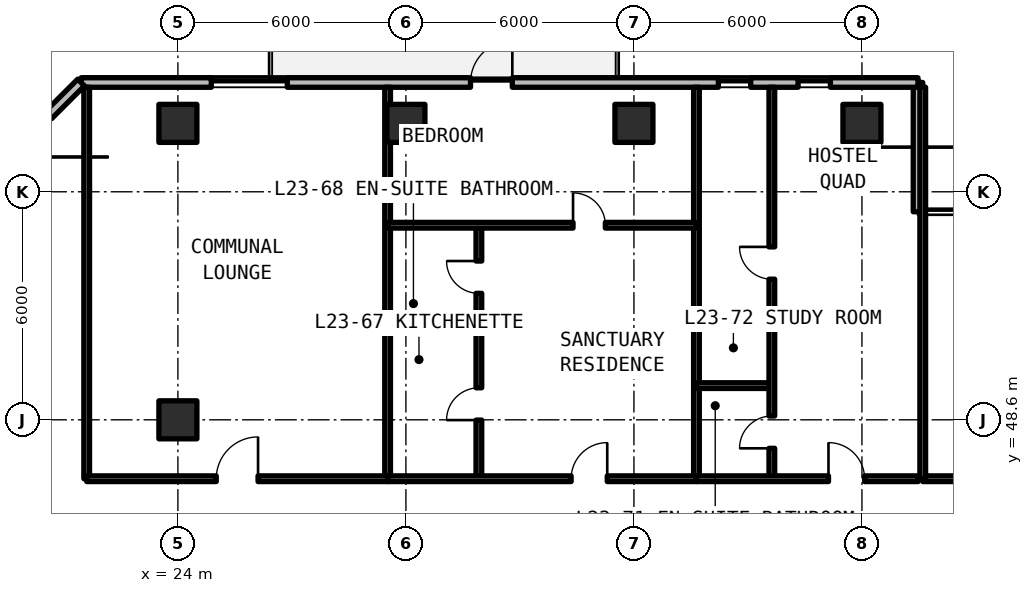
"""IFC4 building model, lengths in metres.
Left out: names, types, materials, properties, quantities, classifications, styles, units other than length and angle.
Written with IfcOpenShell. Run it as: python <this file> out.ifc"""

import sys

from ifc_helpers import new_model, si_unit, direction, frame, frame_2d, origin, origin_2d, place, context, subcontext, project, spatial, rectangle, extrude, element, fill, save


model = new_model("IFC4")
c1 = context("Model", 3, precision=1e-05, world=origin(), true_north=direction((0.0, 1.0)))
c2 = subcontext(c1, "Body", "Model", "MODEL_VIEW")
j1 = project(units=[si_unit("LENGTHUNIT", "METRE"), si_unit("PLANEANGLEUNIT", "RADIAN")], contexts=[c1])
p1 = place(None, origin())
s1 = spatial("IfcSite", under=j1, at=p1, CompositionType="ELEMENT")
p2 = place(p1, origin())
s2 = spatial("IfcBuilding", under=s1, at=p2, CompositionType="ELEMENT")
p3 = place(p2, frame((0.0, 0.0, 85.47)))
s3 = spatial("IfcBuildingStorey", under=s2, at=p3, CompositionType="ELEMENT", Elevation=85.47)
for number, where, z_axis, x_axis in (
    (1, (24.0, 48.6, 0.0), (0.0, 0.0, 1.0), (1.0, 0.0, 0.0)),
    (2, (24.0, 56.4, 0.0), (0.0, 0.0, 1.0), (1.0, 0.0, 0.0)),
    (3, (30.0, 56.4, 0.0), (0.0, 0.0, 1.0), (1.0, 0.0, 0.0)),
    (4, (36.0, 56.4, 0.0), (0.0, 0.0, 1.0), (1.0, 0.0, 0.0)),
    (5, (42.0, 56.4, 0.0), (0.0, 0.0, 1.0), (1.0, 0.0, 0.0)),
):
    element("IfcColumn", number, at=place(p3, frame(where, z_axis=z_axis, x_axis=x_axis)), inside=s3, PredefinedType="COLUMN", context=c2, shape_type="SweptSolid", body=[
        extrude(rectangle(XDim=1.0, YDim=1.0, at=origin_2d()), origin(), (0.0, 0.0, 1.0), 3.3),
    ])
p4 = place(p3, frame((43.475, 54.075, 0.0), z_axis=(0.0, 0.0, 1.0), x_axis=(0.0, 1.0, 0.0)))
e6 = element("IfcWall", 6, at=p4, inside=s3, PredefinedType="SOLIDWALL", context=c2, shape_type="SweptSolid", body=[
    extrude(rectangle(XDim=3.4, YDim=0.25, at=frame_2d((1.7, 0.0))), origin(), (0.0, 0.0, 1.0), 3.08),
])
p5 = place(p3, frame((43.475, 57.475, 0.0), z_axis=(0.0, 0.0, 1.0), x_axis=(-1.0, 0.0, 0.0)))
e7 = element("IfcWall", 7, at=p5, inside=s3, PredefinedType="SOLIDWALL", context=c2, shape_type="SweptSolid", body=[
    extrude(rectangle(XDim=22.023, YDim=0.25, at=frame_2d((11.012, 0.0))), origin(), (0.0, 0.0, 1.0), 3.08),
])
p6 = place(p5, frame((10.675, 0.0, 0.0)))
e8 = element("IfcOpeningElement", 8, at=p6, cuts=e7, PredefinedType="OPENING", context=c2, shape_type="SweptSolid", body=[
    extrude(rectangle(XDim=1.1, YDim=2.15, at=frame_2d((0.55, 1.075))), frame((0.0, 0.135, 0.0), z_axis=(0.0, -1.0, 0.0), x_axis=(1.0, 0.0, 0.0)), (0.0, 0.0, 1.0), 0.27),
])
p7 = place(p5, frame((16.596, 0.0, 0.78)))
e9 = element("IfcOpeningElement", 9, at=p7, cuts=e7, PredefinedType="OPENING", context=c2, shape_type="SweptSolid", body=[
    extrude(rectangle(XDim=2.0, YDim=1.66, at=frame_2d((1.0, 0.83))), frame((0.0, 0.135, 0.0), z_axis=(0.0, -1.0, 0.0), x_axis=(1.0, 0.0, 0.0)), (0.0, 0.0, 1.0), 0.27),
])
p8 = place(p5, frame((4.403, 0.0, 0.78)))
e10 = element("IfcOpeningElement", 10, at=p8, cuts=e7, PredefinedType="OPENING", context=c2, shape_type="SweptSolid", body=[
    extrude(rectangle(XDim=0.85, YDim=1.65, at=frame_2d((0.425, 0.825))), frame((0.0, 0.135, 0.0), z_axis=(0.0, -1.0, 0.0), x_axis=(1.0, 0.0, 0.0)), (0.0, 0.0, 1.0), 0.27),
])
p9 = place(p5, frame((2.305, 0.0, 0.78)))
e11 = element("IfcOpeningElement", 11, at=p9, cuts=e7, PredefinedType="OPENING", context=c2, shape_type="SweptSolid", body=[
    extrude(rectangle(XDim=0.85, YDim=1.65, at=frame_2d((0.425, 0.825))), frame((0.0, 0.135, 0.0), z_axis=(0.0, -1.0, 0.0), x_axis=(1.0, 0.0, 0.0)), (0.0, 0.0, 1.0), 0.27),
])
p10 = place(p3, frame((21.452, 57.475, 0.0), z_axis=(0.0, 0.0, 1.0), x_axis=(-0.707106781187, -0.707106781187, 0.0)))
e12 = element("IfcWall", 12, at=p10, inside=s3, PredefinedType="SOLIDWALL", context=c2, shape_type="SweptSolid", body=[
    extrude(rectangle(XDim=5.836, YDim=0.25, at=frame_2d((2.918, 0.0))), origin(), (0.0, 0.0, 1.0), 3.08),
])
p11 = place(p10, frame((1.218, 0.0, 0.78)))
e13 = element("IfcOpeningElement", 13, at=p11, cuts=e12, PredefinedType="OPENING", context=c2, shape_type="SweptSolid", body=[
    extrude(rectangle(XDim=3.4, YDim=1.66, at=frame_2d((1.7, 0.83))), frame((0.0, 0.135, 0.0), z_axis=(0.0, -1.0, 0.0), x_axis=(1.0, 0.0, 0.0)), (0.0, 0.0, 1.0), 0.27),
])
p12 = place(p3, frame((43.6, 47.05, 0.0), z_axis=(0.0, 0.0, 1.0), x_axis=(1.0, 0.0, 0.0)))
e14 = element("IfcWall", 14, at=p12, inside=s3, PredefinedType="SOLIDWALL", context=c2, shape_type="SweptSolid", body=[
    extrude(rectangle(XDim=8.4, YDim=0.15, at=frame_2d((4.2, 0.0))), origin(), (0.0, 0.0, 1.0), 2.35),
])
p13 = place(p12, frame((3.65, 0.0, 0.0)))
e15 = element("IfcOpeningElement", 15, at=p13, cuts=e14, PredefinedType="OPENING", context=c2, shape_type="SweptSolid", body=[
    extrude(rectangle(XDim=1.1, YDim=2.15, at=frame_2d((0.55, 1.075))), frame((0.0, 0.085, 0.0), z_axis=(0.0, -1.0, 0.0), x_axis=(1.0, 0.0, 0.0)), (0.0, 0.0, 1.0), 0.17),
])
for number, where, z_axis, x_axis in (
    (16, (43.6, 47.05, 0.0), (0.0, 0.0, 1.0), (0.0, 1.0, 0.0)),
    (17, (21.6, 47.05, 0.0), (0.0, 0.0, 1.0), (0.0, 1.0, 0.0)),
    (18, (29.519, 47.05, 0.0), (0.0, 0.0, 1.0), (0.0, 1.0, 0.0)),
):
    element("IfcWall", number, at=place(p3, frame(where, z_axis=z_axis, x_axis=x_axis)), inside=s3, PredefinedType="SOLIDWALL", context=c2, shape_type="SweptSolid", body=[
        extrude(rectangle(XDim=10.3, YDim=0.15, at=frame_2d((5.15, 0.0))), origin(), (0.0, 0.0, 1.0), 2.35),
    ])
p14 = place(p3, frame((21.6, 47.05, 0.0), z_axis=(0.0, 0.0, 1.0), x_axis=(1.0, 0.0, 0.0)))
e19 = element("IfcWall", 19, at=p14, inside=s3, PredefinedType="SOLIDWALL", context=c2, shape_type="SweptSolid", body=[
    extrude(rectangle(XDim=7.918, YDim=0.15, at=frame_2d((3.959, 0.0))), origin(), (0.0, 0.0, 1.0), 2.35),
])
p15 = place(p14, frame((3.409, 0.0, 0.0)))
e20 = element("IfcOpeningElement", 20, at=p15, cuts=e19, PredefinedType="OPENING", context=c2, shape_type="SweptSolid", body=[
    extrude(rectangle(XDim=1.1, YDim=2.15, at=frame_2d((0.55, 1.075))), frame((0.0, 0.085, 0.0), z_axis=(0.0, -1.0, 0.0), x_axis=(1.0, 0.0, 0.0)), (0.0, 0.0, 1.0), 0.17),
])
p16 = place(p3, frame((37.646, 47.05, 0.0), z_axis=(0.0, 0.0, 1.0), x_axis=(0.0, 1.0, 0.0)))
e21 = element("IfcWall", 21, at=p16, inside=s3, PredefinedType="SOLIDWALL", context=c2, shape_type="SweptSolid", body=[
    extrude(rectangle(XDim=10.3, YDim=0.15, at=frame_2d((5.15, 0.0))), origin(), (0.0, 0.0, 1.0), 2.35),
])
p17 = place(p3, frame((29.519, 50.985, 0.0), z_axis=(0.0, 0.0, 1.0), x_axis=(1.0, 0.0, 0.0)))
e22 = element("IfcWall", 22, at=p17, inside=s3, PredefinedType="PARTITIONING", context=c2, shape_type="SweptSolid", body=[
    extrude(rectangle(XDim=2.401, YDim=0.15, at=frame_2d((1.201, 0.0))), origin(), (0.0, 0.0, 1.0), 2.35),
])
p18 = place(p3, frame((31.92, 47.05, 0.0), z_axis=(0.0, 0.0, 1.0), x_axis=(0.0, 1.0, 0.0)))
e23 = element("IfcWall", 23, at=p18, inside=s3, PredefinedType="PARTITIONING", context=c2, shape_type="SweptSolid", body=[
    extrude(rectangle(XDim=6.67, YDim=0.15, at=frame_2d((3.335, 0.0))), origin(), (0.0, 0.0, 1.0), 2.35),
])
p19 = place(p18, frame((1.543, 0.0, 0.0)))
e24 = element("IfcOpeningElement", 24, at=p19, cuts=e23, PredefinedType="OPENING", context=c2, shape_type="SweptSolid", body=[
    extrude(rectangle(XDim=0.85, YDim=2.1, at=frame_2d((0.425, 1.05))), frame((0.0, 0.085, 0.0), z_axis=(0.0, -1.0, 0.0), x_axis=(1.0, 0.0, 0.0)), (0.0, 0.0, 1.0), 0.17),
])
p20 = place(p18, frame((4.878, 0.0, 0.0)))
e25 = element("IfcOpeningElement", 25, at=p20, cuts=e23, PredefinedType="OPENING", context=c2, shape_type="SweptSolid", body=[
    extrude(rectangle(XDim=0.85, YDim=2.1, at=frame_2d((0.425, 1.05))), frame((0.0, 0.085, 0.0), z_axis=(0.0, -1.0, 0.0), x_axis=(1.0, 0.0, 0.0)), (0.0, 0.0, 1.0), 0.17),
])
p21 = place(p3, frame((29.519, 53.72, 0.0), z_axis=(0.0, 0.0, 1.0), x_axis=(1.0, 0.0, 0.0)))
e26 = element("IfcWall", 26, at=p21, inside=s3, PredefinedType="PARTITIONING", context=c2, shape_type="SweptSolid", body=[
    extrude(rectangle(XDim=8.127, YDim=0.15, at=frame_2d((4.063, 0.0))), origin(), (0.0, 0.0, 1.0), 2.35),
])
p22 = place(p21, frame((4.879, 0.0, 0.0)))
e27 = element("IfcOpeningElement", 27, at=p22, cuts=e26, PredefinedType="OPENING", context=c2, shape_type="SweptSolid", body=[
    extrude(rectangle(XDim=0.85, YDim=2.1, at=frame_2d((0.425, 1.05))), frame((0.0, 0.085, 0.0), z_axis=(0.0, -1.0, 0.0), x_axis=(1.0, 0.0, 0.0)), (0.0, 0.0, 1.0), 0.17),
])
p23 = place(p3, frame((29.519, 47.05, 0.0), z_axis=(0.0, 0.0, 1.0), x_axis=(1.0, 0.0, 0.0)))
e28 = element("IfcWall", 28, at=p23, inside=s3, PredefinedType="SOLIDWALL", context=c2, shape_type="SweptSolid", body=[
    extrude(rectangle(XDim=8.127, YDim=0.15, at=frame_2d((4.063, 0.0))), origin(), (0.0, 0.0, 1.0), 2.35),
])
p24 = place(p23, frame((4.829, 0.0, 0.0)))
e29 = element("IfcOpeningElement", 29, at=p24, cuts=e28, PredefinedType="OPENING", context=c2, shape_type="SweptSolid", body=[
    extrude(rectangle(XDim=0.95, YDim=2.15, at=frame_2d((0.475, 1.075))), frame((0.0, 0.085, 0.0), z_axis=(0.0, -1.0, 0.0), x_axis=(1.0, 0.0, 0.0)), (0.0, 0.0, 1.0), 0.17),
])
p25 = place(p3, frame((37.646, 49.5, 0.0), z_axis=(0.0, 0.0, 1.0), x_axis=(1.0, 0.0, 0.0)))
e30 = element("IfcWall", 30, at=p25, inside=s3, PredefinedType="PARTITIONING", context=c2, shape_type="SweptSolid", body=[
    extrude(rectangle(XDim=1.984, YDim=0.15, at=frame_2d((0.992, 0.0))), origin(), (0.0, 0.0, 1.0), 2.35),
])
p26 = place(p3, frame((39.629, 47.05, 0.0), z_axis=(0.0, 0.0, 1.0), x_axis=(0.0, 1.0, 0.0)))
e31 = element("IfcWall", 31, at=p26, inside=s3, PredefinedType="PARTITIONING", context=c2, shape_type="SweptSolid", body=[
    extrude(rectangle(XDim=10.3, YDim=0.15, at=frame_2d((5.15, 0.0))), origin(), (0.0, 0.0, 1.0), 2.35),
])
p27 = place(p26, frame((0.8, 0.0, 0.0)))
e32 = element("IfcOpeningElement", 32, at=p27, cuts=e31, PredefinedType="OPENING", context=c2, shape_type="SweptSolid", body=[
    extrude(rectangle(XDim=0.85, YDim=2.1, at=frame_2d((0.425, 1.05))), frame((0.0, 0.085, 0.0), z_axis=(0.0, -1.0, 0.0), x_axis=(1.0, 0.0, 0.0)), (0.0, 0.0, 1.0), 0.17),
])
p28 = place(p26, frame((5.25, 0.0, 0.0)))
e33 = element("IfcOpeningElement", 33, at=p28, cuts=e31, PredefinedType="OPENING", context=c2, shape_type="SweptSolid", body=[
    extrude(rectangle(XDim=0.85, YDim=2.1, at=frame_2d((0.425, 1.05))), frame((0.0, 0.085, 0.0), z_axis=(0.0, -1.0, 0.0), x_axis=(1.0, 0.0, 0.0)), (0.0, 0.0, 1.0), 0.17),
])
p29 = place(p3, frame((37.646, 47.05, 0.0), z_axis=(0.0, 0.0, 1.0), x_axis=(1.0, 0.0, 0.0)))
e34 = element("IfcWall", 34, at=p29, inside=s3, PredefinedType="SOLIDWALL", context=c2, shape_type="SweptSolid", body=[
    extrude(rectangle(XDim=5.834, YDim=0.15, at=frame_2d((2.917, 0.0))), origin(), (0.0, 0.0, 1.0), 2.35),
])
p30 = place(p29, frame((3.474, 0.0, 0.0)))
e35 = element("IfcOpeningElement", 35, at=p30, cuts=e34, PredefinedType="OPENING", context=c2, shape_type="SweptSolid", body=[
    extrude(rectangle(XDim=0.95, YDim=2.15, at=frame_2d((0.475, 1.075))), frame((0.0, 0.085, 0.0), z_axis=(0.0, -1.0, 0.0), x_axis=(1.0, 0.0, 0.0)), (0.0, 0.0, 1.0), 0.17),
])
p31 = place(p6, frame((1.1, 0.0, 0.0), z_axis=(0.0, 0.0, 1.0), x_axis=(-1.0, 0.0, 0.0)))
e36 = element("IfcDoor", 36, at=p31, inside=s3, OperationType="SINGLE_SWING_RIGHT", PredefinedType="DOOR", context=c2, shape_type="SweptSolid", body=[
    extrude(rectangle(XDim=1.1, YDim=2.15, at=frame_2d((0.55, 1.075))), frame((0.0, 0.025, 0.0), z_axis=(0.0, -1.0, 0.0), x_axis=(1.0, 0.0, 0.0)), (0.0, 0.0, 1.0), 0.05),
])
fill(e8, e36)
p32 = place(p7, origin())
e37 = element("IfcWindow", 37, at=p32, inside=s3, PartitioningType="SINGLE_PANEL", PredefinedType="WINDOW", context=c2, shape_type="SweptSolid", body=[
    extrude(rectangle(XDim=2.0, YDim=1.66, at=frame_2d((1.0, 0.83))), frame((0.0, 0.03, 0.0), z_axis=(0.0, -1.0, 0.0), x_axis=(1.0, 0.0, 0.0)), (0.0, 0.0, 1.0), 0.06),
])
fill(e9, e37)
p33 = place(p8, origin())
e38 = element("IfcWindow", 38, at=p33, inside=s3, PartitioningType="SINGLE_PANEL", PredefinedType="WINDOW", context=c2, shape_type="SweptSolid", body=[
    extrude(rectangle(XDim=0.85, YDim=1.65, at=frame_2d((0.425, 0.825))), frame((0.0, 0.03, 0.0), z_axis=(0.0, -1.0, 0.0), x_axis=(1.0, 0.0, 0.0)), (0.0, 0.0, 1.0), 0.06),
])
fill(e10, e38)
p34 = place(p9, origin())
e39 = element("IfcWindow", 39, at=p34, inside=s3, PartitioningType="SINGLE_PANEL", PredefinedType="WINDOW", context=c2, shape_type="SweptSolid", body=[
    extrude(rectangle(XDim=0.85, YDim=1.65, at=frame_2d((0.425, 0.825))), frame((0.0, 0.03, 0.0), z_axis=(0.0, -1.0, 0.0), x_axis=(1.0, 0.0, 0.0)), (0.0, 0.0, 1.0), 0.06),
])
fill(e11, e39)
p35 = place(p15, origin())
e40 = element("IfcDoor", 40, at=p35, inside=s3, OperationType="SINGLE_SWING_RIGHT", PredefinedType="DOOR", context=c2, shape_type="SweptSolid", body=[
    extrude(rectangle(XDim=1.1, YDim=2.15, at=frame_2d((0.55, 1.075))), frame((0.0, 0.025, 0.0), z_axis=(0.0, -1.0, 0.0), x_axis=(1.0, 0.0, 0.0)), (0.0, 0.0, 1.0), 0.05),
])
fill(e20, e40)
p36 = place(p19, origin())
e41 = element("IfcDoor", 41, at=p36, inside=s3, OperationType="SINGLE_SWING_LEFT", PredefinedType="DOOR", context=c2, shape_type="SweptSolid", body=[
    extrude(rectangle(XDim=0.85, YDim=2.1, at=frame_2d((0.425, 1.05))), frame((0.0, 0.025, 0.0), z_axis=(0.0, -1.0, 0.0), x_axis=(1.0, 0.0, 0.0)), (0.0, 0.0, 1.0), 0.05),
])
fill(e24, e41)
p37 = place(p20, origin())
e42 = element("IfcDoor", 42, at=p37, inside=s3, OperationType="SINGLE_SWING_RIGHT", PredefinedType="DOOR", context=c2, shape_type="SweptSolid", body=[
    extrude(rectangle(XDim=0.85, YDim=2.1, at=frame_2d((0.425, 1.05))), frame((0.0, 0.025, 0.0), z_axis=(0.0, -1.0, 0.0), x_axis=(1.0, 0.0, 0.0)), (0.0, 0.0, 1.0), 0.05),
])
fill(e25, e42)
p38 = place(p22, origin())
e43 = element("IfcDoor", 43, at=p38, inside=s3, OperationType="SINGLE_SWING_LEFT", PredefinedType="DOOR", context=c2, shape_type="SweptSolid", body=[
    extrude(rectangle(XDim=0.85, YDim=2.1, at=frame_2d((0.425, 1.05))), frame((0.0, 0.025, 0.0), z_axis=(0.0, -1.0, 0.0), x_axis=(1.0, 0.0, 0.0)), (0.0, 0.0, 1.0), 0.05),
])
fill(e27, e43)
p39 = place(p24, origin())
e44 = element("IfcDoor", 44, at=p39, inside=s3, OperationType="SINGLE_SWING_RIGHT", PredefinedType="DOOR", context=c2, shape_type="SweptSolid", body=[
    extrude(rectangle(XDim=0.95, YDim=2.15, at=frame_2d((0.475, 1.075))), frame((0.0, 0.025, 0.0), z_axis=(0.0, -1.0, 0.0), x_axis=(1.0, 0.0, 0.0)), (0.0, 0.0, 1.0), 0.05),
])
fill(e29, e44)
p40 = place(p27, origin())
e45 = element("IfcDoor", 45, at=p40, inside=s3, OperationType="SINGLE_SWING_LEFT", PredefinedType="DOOR", context=c2, shape_type="SweptSolid", body=[
    extrude(rectangle(XDim=0.85, YDim=2.1, at=frame_2d((0.425, 1.05))), frame((0.0, 0.025, 0.0), z_axis=(0.0, -1.0, 0.0), x_axis=(1.0, 0.0, 0.0)), (0.0, 0.0, 1.0), 0.05),
])
fill(e32, e45)
p41 = place(p28, origin())
e46 = element("IfcDoor", 46, at=p41, inside=s3, OperationType="SINGLE_SWING_RIGHT", PredefinedType="DOOR", context=c2, shape_type="SweptSolid", body=[
    extrude(rectangle(XDim=0.85, YDim=2.1, at=frame_2d((0.425, 1.05))), frame((0.0, 0.025, 0.0), z_axis=(0.0, -1.0, 0.0), x_axis=(1.0, 0.0, 0.0)), (0.0, 0.0, 1.0), 0.05),
])
fill(e33, e46)
p42 = place(p30, origin())
e47 = element("IfcDoor", 47, at=p42, inside=s3, OperationType="SINGLE_SWING_LEFT", PredefinedType="DOOR", context=c2, shape_type="SweptSolid", body=[
    extrude(rectangle(XDim=0.95, YDim=2.15, at=frame_2d((0.475, 1.075))), frame((0.0, 0.025, 0.0), z_axis=(0.0, -1.0, 0.0), x_axis=(1.0, 0.0, 0.0)), (0.0, 0.0, 1.0), 0.05),
])
fill(e35, e47)
save(model, sys.argv[1])
